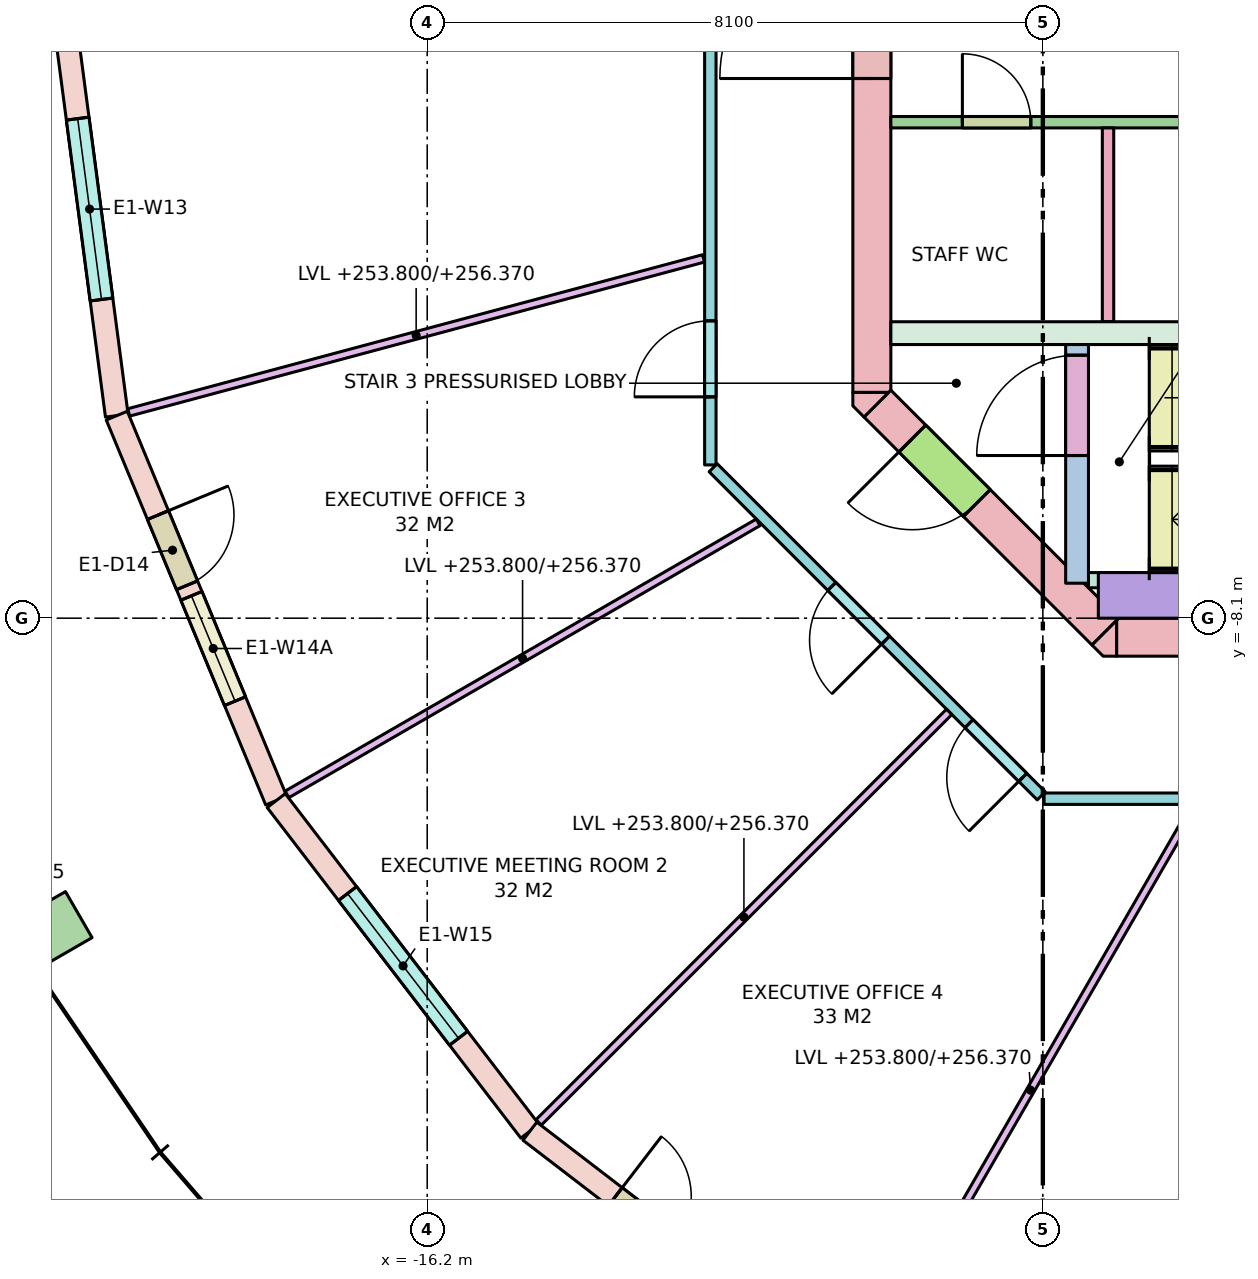
"""IFC4 building model, lengths in metres.
Left out: names, types, materials, properties, quantities, classifications, styles, units other than length and angle.
Written with IfcOpenShell. Run it as: python <this file> out.ifc"""

import sys

from ifc_helpers import new_model, si_unit, direction, frame, frame_2d, origin, origin_2d, place, context, subcontext, project, spatial, polyline, rectangle, outline, extrude, element, fill, save


model = new_model("IFC4")
c1 = context("Model", 3, precision=1e-05, world=origin(), true_north=direction((0.0, 1.0)))
c2 = subcontext(c1, "Body", "Model", "MODEL_VIEW")
j1 = project(units=[si_unit("LENGTHUNIT", "METRE"), si_unit("PLANEANGLEUNIT", "RADIAN")], contexts=[c1])
p1 = place(None, origin())
s1 = spatial("IfcSite", under=j1, at=p1, CompositionType="ELEMENT")
p2 = place(p1, origin())
s2 = spatial("IfcBuilding", under=s1, at=p2, CompositionType="ELEMENT")
p3 = place(p2, frame((0.0, 0.0, 253.8)))
s3 = spatial("IfcBuildingStorey", under=s2, at=p3, CompositionType="ELEMENT", Elevation=253.8)
p4 = place(p3, frame((-21.218, -12.25, 0.0), z_axis=(0.0, 0.0, 1.0), x_axis=(0.5, -0.866025403784, 0.0)))
e1 = element("IfcColumn", 1, at=p4, inside=s3, PredefinedType="COLUMN", context=c2, shape_type="SweptSolid", body=[
    extrude(rectangle(XDim=0.7, YDim=1.0, at=origin_2d()), origin(), (0.0, 0.0, 1.0), 3.7),
])
p5 = place(p3, frame((-7.13, -8.35, -0.28), z_axis=(0.0, 0.0, 1.0), x_axis=(1.0, 0.0, 0.0)))
e2 = element("IfcWall", 2, at=p5, inside=s3, PredefinedType="SHEAR", context=c2, shape_type="SweptSolid", body=[
    extrude(rectangle(XDim=14.26, YDim=0.5, at=frame_2d((7.13, 0.0))), origin(), (0.0, 0.0, 1.0), 3.7),
])
p6 = place(p5, frame((8.08, 0.0, 0.28)))
e3 = element("IfcOpeningElement", 3, at=p6, cuts=e2, PredefinedType="OPENING", context=c2, shape_type="SweptSolid", body=[
    extrude(rectangle(XDim=0.7, YDim=2.1, at=frame_2d((0.35, 1.05))), frame((0.0, 0.26, 0.0), z_axis=(0.0, -1.0, 0.0), x_axis=(1.0, 0.0, 0.0)), (0.0, 0.0, 1.0), 0.52),
])
p7 = place(p5, frame((6.205, 0.0, 0.28)))
e4 = element("IfcOpeningElement", 4, at=p7, cuts=e2, PredefinedType="OPENING", context=c2, shape_type="SweptSolid", body=[
    extrude(rectangle(XDim=0.9, YDim=2.1, at=frame_2d((0.45, 1.05))), frame((0.0, 0.26, 0.0), z_axis=(0.0, -1.0, 0.0), x_axis=(1.0, 0.0, 0.0)), (0.0, 0.0, 1.0), 0.52),
])
p8 = place(p5, frame((9.967, 0.0, 0.28)))
e5 = element("IfcOpeningElement", 5, at=p8, cuts=e2, PredefinedType="OPENING", context=c2, shape_type="SweptSolid", body=[
    extrude(rectangle(XDim=0.9, YDim=2.1, at=frame_2d((0.45, 1.05))), frame((0.0, 0.26, 0.0), z_axis=(0.0, -1.0, 0.0), x_axis=(1.0, 0.0, 0.0)), (0.0, 0.0, 1.0), 0.52),
])
p9 = place(p5, frame((12.567, 0.0, 0.28)))
e6 = element("IfcOpeningElement", 6, at=p9, cuts=e2, PredefinedType="OPENING", context=c2, shape_type="SweptSolid", body=[
    extrude(rectangle(XDim=0.9, YDim=2.1, at=frame_2d((0.45, 1.05))), frame((0.0, 0.26, 0.0), z_axis=(0.0, -1.0, 0.0), x_axis=(1.0, 0.0, 0.0)), (0.0, 0.0, 1.0), 0.52),
])
p10 = place(p3, frame((-10.35, -5.13, -0.28), z_axis=(0.0, 0.0, 1.0), x_axis=(0.0, 1.0, 0.0)))
e7 = element("IfcWall", 7, at=p10, inside=s3, PredefinedType="SHEAR", context=c2, shape_type="SweptSolid", body=[
    extrude(rectangle(XDim=10.26, YDim=0.5, at=frame_2d((5.13, 0.0))), origin(), (0.0, 0.0, 1.0), 3.7),
])
p11 = place(p10, frame((4.13, 0.0, 0.28)))
e8 = element("IfcOpeningElement", 8, at=p11, cuts=e7, PredefinedType="OPENING", context=c2, shape_type="SweptSolid", body=[
    extrude(rectangle(XDim=2.0, YDim=2.1, at=frame_2d((1.0, 1.05))), frame((0.0, 0.26, 0.0), z_axis=(0.0, -1.0, 0.0), x_axis=(1.0, 0.0, 0.0)), (0.0, 0.0, 1.0), 0.52),
])
p12 = place(p3, frame((-7.277, -8.277, -0.28), z_axis=(0.0, 0.0, 1.0), x_axis=(-0.707106781187, 0.707106781187, 0.0)))
e9 = element("IfcWall", 9, at=p12, inside=s3, PredefinedType="SHEAR", context=c2, shape_type="SweptSolid", body=[
    extrude(rectangle(XDim=4.243, YDim=0.5, at=frame_2d((2.121, 0.0))), origin(), (0.0, 0.0, 1.0), 3.7),
])
p13 = place(p12, frame((2.393, 0.0, 0.28)))
e10 = element("IfcOpeningElement", 10, at=p13, cuts=e9, PredefinedType="OPENING", context=c2, shape_type="SweptSolid", body=[
    extrude(rectangle(XDim=1.2, YDim=2.1, at=frame_2d((0.6, 1.05))), frame((0.0, 0.26, 0.0), z_axis=(0.0, -1.0, 0.0), x_axis=(1.0, 0.0, 0.0)), (0.0, 0.0, 1.0), 0.52),
])
p14 = place(p3, frame((0.0, 0.0, -0.28)))
e11 = element("IfcWall", 11, at=p14, inside=s3, PredefinedType="SHEAR", context=c2, shape_type="SweptSolid", body=[
    extrude(outline(polyline([(-7.307, -8.6), (-7.454, -8.454), (-7.13, -8.13), (-7.13, -8.6), (-7.307, -8.6)])), origin(), (0.0, 0.0, 1.0), 3.7),
])
p15 = place(p3, frame((0.0, 0.0, -0.28)))
e12 = element("IfcWall", 12, at=p15, inside=s3, PredefinedType="SHEAR", context=c2, shape_type="SweptSolid", body=[
    extrude(outline(polyline([(-10.6, -5.307), (-10.6, -5.13), (-10.13, -5.13), (-10.454, -5.454), (-10.6, -5.307)])), origin(), (0.0, 0.0, 1.0), 3.7),
])
p16 = place(p3, frame((-10.1, -4.35, 0.0), z_axis=(0.0, 0.0, 1.0), x_axis=(1.0, 0.0, 0.0)))
e13 = element("IfcWall", 13, at=p16, inside=s3, PredefinedType="SOLIDWALL", context=c2, shape_type="SweptSolid", body=[
    extrude(rectangle(XDim=8.1, YDim=0.3, at=frame_2d((4.05, 0.0))), origin(), (0.0, 0.0, 1.0), 3.42),
])
p17 = place(p3, frame((-7.65, -7.64, 0.0), z_axis=(0.0, 0.0, 1.0), x_axis=(0.0, 1.0, 0.0)))
e14 = element("IfcWall", 14, at=p17, inside=s3, PredefinedType="SHEAR", context=c2, shape_type="SweptSolid", body=[
    extrude(rectangle(XDim=3.14, YDim=0.3, at=frame_2d((1.57, 0.0))), origin(), (0.0, 0.0, 1.0), 3.42),
])
p18 = place(p17, frame((1.68, 0.0, 0.0)))
e15 = element("IfcOpeningElement", 15, at=p18, cuts=e14, PredefinedType="OPENING", context=c2, shape_type="SweptSolid", body=[
    extrude(rectangle(XDim=1.32, YDim=2.1, at=frame_2d((0.66, 1.05))), frame((0.0, 0.16, 0.0), z_axis=(0.0, -1.0, 0.0), x_axis=(1.0, 0.0, 0.0)), (0.0, 0.0, 1.0), 0.32),
])
p19 = place(p3, frame((-7.5, -7.6, 0.0), z_axis=(0.0, 0.0, 1.0), x_axis=(1.0, 0.0, 0.0)))
e16 = element("IfcWall", 16, at=p19, inside=s3, PredefinedType="SHEAR", context=c2, shape_type="SweptSolid", body=[
    extrude(rectangle(XDim=0.6, YDim=0.2, at=frame_2d((0.3, 0.0))), origin(), (0.0, 0.0, 1.0), 3.42),
])
p20 = place(p3, frame((-7.37, -7.8, 0.0), z_axis=(0.0, 0.0, 1.0), x_axis=(1.0, 0.0, 0.0)))
e17 = element("IfcWall", 17, at=p20, inside=s3, PredefinedType="SHEAR", context=c2, shape_type="SweptSolid", body=[
    extrude(rectangle(XDim=5.37, YDim=0.6, at=frame_2d((2.685, 0.0))), origin(), (0.0, 0.0, 1.0), 3.42),
])
p21 = place(p3, frame((-21.0, 0.0, 0.0), z_axis=(0.0, 0.0, 1.0), x_axis=(0.130527087244, -0.991444743541, 0.0)))
e18 = element("IfcWall", 18, at=p21, inside=s3, PredefinedType="STANDARD", context=c2, shape_type="SweptSolid", body=[
    extrude(rectangle(XDim=5.482, YDim=0.3, at=frame_2d((2.741, 0.0))), origin(), (0.0, 0.0, 1.0), 3.42),
])
p22 = place(p21, frame((1.541, 0.0, 0.8)))
e19 = element("IfcOpeningElement", 19, at=p22, cuts=e18, PredefinedType="OPENING", context=c2, shape_type="SweptSolid", body=[
    extrude(rectangle(XDim=2.4, YDim=2.4, at=frame_2d((1.2, 1.2))), frame((0.0, 0.16, 0.0), z_axis=(0.0, -1.0, 0.0), x_axis=(1.0, 0.0, 0.0)), (0.0, 0.0, 1.0), 0.32),
])
p23 = place(p3, frame((-20.284, -5.435, 0.0), z_axis=(0.0, 0.0, 1.0), x_axis=(0.382688740813, -0.923877333662, 0.0)))
e20 = element("IfcWall", 20, at=p23, inside=s3, PredefinedType="STANDARD", context=c2, shape_type="SweptSolid", body=[
    extrude(rectangle(XDim=5.482, YDim=0.3, at=frame_2d((2.741, 0.0))), origin(), (0.0, 0.0, 1.0), 3.42),
])
p24 = place(p23, frame((1.416, 0.0, 0.0)))
e21 = element("IfcOpeningElement", 21, at=p24, cuts=e20, PredefinedType="OPENING", context=c2, shape_type="SweptSolid", body=[
    extrude(rectangle(XDim=1.0, YDim=2.4, at=frame_2d((0.5, 1.2))), frame((0.0, 0.16, 0.0), z_axis=(0.0, -1.0, 0.0), x_axis=(1.0, 0.0, 0.0)), (0.0, 0.0, 1.0), 0.32),
])
p25 = place(p23, frame((2.566, 0.0, 0.8)))
e22 = element("IfcOpeningElement", 22, at=p25, cuts=e20, PredefinedType="OPENING", context=c2, shape_type="SweptSolid", body=[
    extrude(rectangle(XDim=1.5, YDim=2.4, at=frame_2d((0.75, 1.2))), frame((0.0, 0.16, 0.0), z_axis=(0.0, -1.0, 0.0), x_axis=(1.0, 0.0, 0.0)), (0.0, 0.0, 1.0), 0.32),
])
p26 = place(p3, frame((-18.187, -10.5, 0.0), z_axis=(0.0, 0.0, 1.0), x_axis=(0.608784891166, -0.793335336593, 0.0)))
e23 = element("IfcWall", 23, at=p26, inside=s3, PredefinedType="STANDARD", context=c2, shape_type="SweptSolid", body=[
    extrude(rectangle(XDim=5.482, YDim=0.3, at=frame_2d((2.741, 0.0))), origin(), (0.0, 0.0, 1.0), 3.42),
])
p27 = place(p26, frame((1.541, 0.0, 0.8)))
e24 = element("IfcOpeningElement", 24, at=p27, cuts=e23, PredefinedType="OPENING", context=c2, shape_type="SweptSolid", body=[
    extrude(rectangle(XDim=2.4, YDim=2.4, at=frame_2d((1.2, 1.2))), frame((0.0, 0.16, 0.0), z_axis=(0.0, -1.0, 0.0), x_axis=(1.0, 0.0, 0.0)), (0.0, 0.0, 1.0), 0.32),
])
p28 = place(p3, frame((-14.849, -14.849, 0.0), z_axis=(0.0, 0.0, 1.0), x_axis=(0.793335336593, -0.608784891166, 0.0)))
e25 = element("IfcWall", 25, at=p28, inside=s3, PredefinedType="STANDARD", context=c2, shape_type="SweptSolid", body=[
    extrude(rectangle(XDim=5.482, YDim=0.3, at=frame_2d((2.741, 0.0))), origin(), (0.0, 0.0, 1.0), 3.42),
])
p29 = place(p28, frame((1.416, 0.0, 0.0)))
e26 = element("IfcOpeningElement", 26, at=p29, cuts=e25, PredefinedType="OPENING", context=c2, shape_type="SweptSolid", body=[
    extrude(rectangle(XDim=1.0, YDim=2.4, at=frame_2d((0.5, 1.2))), frame((0.0, 0.16, 0.0), z_axis=(0.0, -1.0, 0.0), x_axis=(1.0, 0.0, 0.0)), (0.0, 0.0, 1.0), 0.32),
])
p30 = place(p28, frame((2.566, 0.0, 0.8)))
e27 = element("IfcOpeningElement", 27, at=p30, cuts=e25, PredefinedType="OPENING", context=c2, shape_type="SweptSolid", body=[
    extrude(rectangle(XDim=1.5, YDim=2.4, at=frame_2d((0.75, 1.2))), frame((0.0, 0.16, 0.0), z_axis=(0.0, -1.0, 0.0), x_axis=(1.0, 0.0, 0.0)), (0.0, 0.0, 1.0), 0.32),
])
p31 = place(p3, frame((-7.242, -4.2, 0.0), z_axis=(0.0, 0.0, 1.0), x_axis=(0.0, 1.0, 0.0)))
e28 = element("IfcWall", 28, at=p31, inside=s3, PredefinedType="PARTITIONING", context=c2, shape_type="SweptSolid", body=[
    extrude(rectangle(XDim=2.55, YDim=0.15, at=frame_2d((1.275, 0.0))), origin(), (0.0, 0.0, 1.0), 3.42),
])
p32 = place(p3, frame((-10.1, -1.575, 0.0), z_axis=(0.0, 0.0, 1.0), x_axis=(1.0, 0.0, 0.0)))
e29 = element("IfcWall", 29, at=p32, inside=s3, PredefinedType="PARTITIONING", context=c2, shape_type="SweptSolid", body=[
    extrude(rectangle(XDim=8.1, YDim=0.15, at=frame_2d((4.05, 0.0))), origin(), (0.0, 0.0, 1.0), 3.42),
])
p33 = place(p32, frame((0.941, 0.0, 0.0)))
e30 = element("IfcOpeningElement", 30, at=p33, cuts=e29, PredefinedType="OPENING", context=c2, shape_type="SweptSolid", body=[
    extrude(rectangle(XDim=0.9, YDim=2.1, at=frame_2d((0.45, 1.05))), frame((0.0, 0.085, 0.0), z_axis=(0.0, -1.0, 0.0), x_axis=(1.0, 0.0, 0.0)), (0.0, 0.0, 1.0), 0.17),
])
p34 = place(p32, frame((5.066, 0.0, 0.0)))
e31 = element("IfcOpeningElement", 31, at=p34, cuts=e29, PredefinedType="OPENING", context=c2, shape_type="SweptSolid", body=[
    extrude(rectangle(XDim=0.9, YDim=2.1, at=frame_2d((0.45, 1.05))), frame((0.0, 0.085, 0.0), z_axis=(0.0, -1.0, 0.0), x_axis=(1.0, 0.0, 0.0)), (0.0, 0.0, 1.0), 0.17),
])
p35 = place(p3, frame((8.084, -10.475, 0.0), z_axis=(0.0, 0.0, 1.0), x_axis=(-1.0, 0.0, 0.0)))
e32 = element("IfcWall", 32, at=p35, inside=s3, PredefinedType="PARTITIONING", context=c2, shape_type="SweptSolid", body=[
    extrude(rectangle(XDim=16.167, YDim=0.15, at=frame_2d((8.084, 0.0))), origin(), (0.0, 0.0, 1.0), 2.57),
])
p36 = place(p35, frame((12.065, 0.0, 0.0)))
e33 = element("IfcOpeningElement", 33, at=p36, cuts=e32, PredefinedType="OPENING", context=c2, shape_type="SweptSolid", body=[
    extrude(rectangle(XDim=0.9, YDim=2.1, at=frame_2d((0.45, 1.05))), frame((0.0, 0.085, 0.0), z_axis=(0.0, -1.0, 0.0), x_axis=(1.0, 0.0, 0.0)), (0.0, 0.0, 1.0), 0.17),
])
p37 = place(p35, frame((7.584, 0.0, 0.0)))
e34 = element("IfcOpeningElement", 34, at=p37, cuts=e32, PredefinedType="OPENING", context=c2, shape_type="SweptSolid", body=[
    extrude(rectangle(XDim=1.0, YDim=2.1, at=frame_2d((0.5, 1.05))), frame((0.0, 0.085, 0.0), z_axis=(0.0, -1.0, 0.0), x_axis=(1.0, 0.0, 0.0)), (0.0, 0.0, 1.0), 0.17),
])
p38 = place(p35, frame((3.153, 0.0, 0.0)))
e35 = element("IfcOpeningElement", 35, at=p38, cuts=e32, PredefinedType="OPENING", context=c2, shape_type="SweptSolid", body=[
    extrude(rectangle(XDim=1.0, YDim=2.1, at=frame_2d((0.5, 1.05))), frame((0.0, 0.085, 0.0), z_axis=(0.0, -1.0, 0.0), x_axis=(1.0, 0.0, 0.0)), (0.0, 0.0, 1.0), 0.17),
])
p39 = place(p3, frame((-8.121, -10.438, 0.0), z_axis=(0.0, 0.0, 1.0), x_axis=(-0.707106781187, 0.707106781187, 0.0)))
e36 = element("IfcWall", 36, at=p39, inside=s3, PredefinedType="PARTITIONING", context=c2, shape_type="SweptSolid", body=[
    extrude(rectangle(XDim=6.105, YDim=0.15, at=frame_2d((3.053, 0.0))), origin(), (0.0, 0.0, 1.0), 2.57),
])
p40 = place(p39, frame((2.897, 0.0, 0.0)))
e37 = element("IfcOpeningElement", 37, at=p40, cuts=e36, PredefinedType="OPENING", context=c2, shape_type="SweptSolid", body=[
    extrude(rectangle(XDim=1.0, YDim=2.1, at=frame_2d((0.5, 1.05))), frame((0.0, 0.085, 0.0), z_axis=(0.0, -1.0, 0.0), x_axis=(1.0, 0.0, 0.0)), (0.0, 0.0, 1.0), 0.17),
])
p41 = place(p39, frame((0.344, 0.0, 0.0)))
e38 = element("IfcOpeningElement", 38, at=p41, cuts=e36, PredefinedType="OPENING", context=c2, shape_type="SweptSolid", body=[
    extrude(rectangle(XDim=1.0, YDim=2.1, at=frame_2d((0.5, 1.05))), frame((0.0, 0.085, 0.0), z_axis=(0.0, -1.0, 0.0), x_axis=(1.0, 0.0, 0.0)), (0.0, 0.0, 1.0), 0.17),
])
p42 = place(p3, frame((-12.475, -6.084, 0.0), z_axis=(0.0, 0.0, 1.0), x_axis=(0.0, 1.0, 0.0)))
e39 = element("IfcWall", 39, at=p42, inside=s3, PredefinedType="PARTITIONING", context=c2, shape_type="SweptSolid", body=[
    extrude(rectangle(XDim=12.167, YDim=0.15, at=frame_2d((6.084, 0.0))), origin(), (0.0, 0.0, 1.0), 2.57),
])
p43 = place(p42, frame((6.928, 0.0, 0.0)))
e40 = element("IfcOpeningElement", 40, at=p43, cuts=e39, PredefinedType="OPENING", context=c2, shape_type="SweptSolid", body=[
    extrude(rectangle(XDim=1.0, YDim=2.1, at=frame_2d((0.5, 1.05))), frame((0.0, 0.085, 0.0), z_axis=(0.0, -1.0, 0.0), x_axis=(1.0, 0.0, 0.0)), (0.0, 0.0, 1.0), 0.17),
])
p44 = place(p42, frame((0.896, 0.0, 0.0)))
e41 = element("IfcOpeningElement", 41, at=p44, cuts=e39, PredefinedType="OPENING", context=c2, shape_type="SweptSolid", body=[
    extrude(rectangle(XDim=1.0, YDim=2.1, at=frame_2d((0.5, 1.05))), frame((0.0, 0.085, 0.0), z_axis=(0.0, -1.0, 0.0), x_axis=(1.0, 0.0, 0.0)), (0.0, 0.0, 1.0), 0.17),
])
p45 = place(p3, frame((-12.564, -3.367, 0.0), z_axis=(0.0, 0.0, 1.0), x_axis=(-0.965933576344, -0.258790119773, 0.0)))
e42 = element("IfcWall", 42, at=p45, inside=s3, PredefinedType="PARTITIONING", context=c2, shape_type="SweptSolid", body=[
    extrude(rectangle(XDim=7.829, YDim=0.1, at=frame_2d((3.915, 0.0))), origin(), (0.0, 0.0, 1.0), 2.57),
])
p46 = place(p3, frame((-11.846, -6.839, 0.0), z_axis=(0.0, 0.0, 1.0), x_axis=(-0.866011787705, -0.500023583, 0.0)))
e43 = element("IfcWall", 43, at=p46, inside=s3, PredefinedType="PARTITIONING", context=c2, shape_type="SweptSolid", body=[
    extrude(rectangle(XDim=7.158, YDim=0.1, at=frame_2d((3.579, 0.0))), origin(), (0.0, 0.0, 1.0), 2.57),
])
p47 = place(p3, frame((-9.333, -9.333, 0.0), z_axis=(0.0, 0.0, 1.0), x_axis=(-0.707106781187, -0.707106781187, 0.0)))
e44 = element("IfcWall", 44, at=p47, inside=s3, PredefinedType="PARTITIONING", context=c2, shape_type="SweptSolid", body=[
    extrude(rectangle(XDim=7.639, YDim=0.1, at=frame_2d((3.819, 0.0))), origin(), (0.0, 0.0, 1.0), 2.57),
])
p48 = place(p3, frame((-6.105, -10.575, 0.0), z_axis=(0.0, 0.0, 1.0), x_axis=(-0.50001399067, -0.866017326117, 0.0)))
e45 = element("IfcWall", 45, at=p48, inside=s3, PredefinedType="PARTITIONING", context=c2, shape_type="SweptSolid", body=[
    extrude(rectangle(XDim=8.626, YDim=0.1, at=frame_2d((4.313, 0.0))), origin(), (0.0, 0.0, 1.0), 2.57),
])
p49 = place(p22, origin())
e46 = element("IfcWindow", 46, at=p49, inside=s3, PartitioningType="SINGLE_PANEL", PredefinedType="WINDOW", context=c2, shape_type="SweptSolid", body=[
    extrude(rectangle(XDim=2.4, YDim=2.4, at=frame_2d((1.2, 1.2))), frame((0.0, 0.03, 0.0), z_axis=(0.0, -1.0, 0.0), x_axis=(1.0, 0.0, 0.0)), (0.0, 0.0, 1.0), 0.06),
])
fill(e19, e46)
p50 = place(p24, origin())
e47 = element("IfcDoor", 47, at=p50, inside=s3, OperationType="SINGLE_SWING_LEFT", PredefinedType="DOOR", context=c2, shape_type="SweptSolid", body=[
    extrude(rectangle(XDim=1.0, YDim=2.4, at=frame_2d((0.5, 1.2))), frame((0.0, 0.025, 0.0), z_axis=(0.0, -1.0, 0.0), x_axis=(1.0, 0.0, 0.0)), (0.0, 0.0, 1.0), 0.05),
])
fill(e21, e47)
p51 = place(p25, origin())
e48 = element("IfcWindow", 48, at=p51, inside=s3, PartitioningType="SINGLE_PANEL", PredefinedType="WINDOW", context=c2, shape_type="SweptSolid", body=[
    extrude(rectangle(XDim=1.5, YDim=2.4, at=frame_2d((0.75, 1.2))), frame((0.0, 0.03, 0.0), z_axis=(0.0, -1.0, 0.0), x_axis=(1.0, 0.0, 0.0)), (0.0, 0.0, 1.0), 0.06),
])
fill(e22, e48)
p52 = place(p27, origin())
e49 = element("IfcWindow", 49, at=p52, inside=s3, PartitioningType="SINGLE_PANEL", PredefinedType="WINDOW", context=c2, shape_type="SweptSolid", body=[
    extrude(rectangle(XDim=2.4, YDim=2.4, at=frame_2d((1.2, 1.2))), frame((0.0, 0.03, 0.0), z_axis=(0.0, -1.0, 0.0), x_axis=(1.0, 0.0, 0.0)), (0.0, 0.0, 1.0), 0.06),
])
fill(e24, e49)
p53 = place(p29, origin())
e50 = element("IfcDoor", 50, at=p53, inside=s3, OperationType="SINGLE_SWING_LEFT", PredefinedType="DOOR", context=c2, shape_type="SweptSolid", body=[
    extrude(rectangle(XDim=1.0, YDim=2.4, at=frame_2d((0.5, 1.2))), frame((0.0, 0.025, 0.0), z_axis=(0.0, -1.0, 0.0), x_axis=(1.0, 0.0, 0.0)), (0.0, 0.0, 1.0), 0.05),
])
fill(e26, e50)
p54 = place(p18, origin())
e51 = element("IfcDoor", 51, at=p54, inside=s3, OperationType="DOUBLE_DOOR_SINGLE_SWING", PredefinedType="DOOR", context=c2, shape_type="SweptSolid", body=[
    extrude(rectangle(XDim=1.32, YDim=2.1, at=frame_2d((0.66, 1.05))), frame((0.0, 0.025, 0.0), z_axis=(0.0, -1.0, 0.0), x_axis=(1.0, 0.0, 0.0)), (0.0, 0.0, 1.0), 0.05),
])
fill(e15, e51)
p55 = place(p13, origin())
e52 = element("IfcDoor", 52, at=p55, inside=s3, OperationType="SINGLE_SWING_RIGHT", PredefinedType="DOOR", context=c2, shape_type="SweptSolid", body=[
    extrude(rectangle(XDim=1.2, YDim=2.1, at=frame_2d((0.6, 1.05))), frame((0.0, 0.025, 0.0), z_axis=(0.0, -1.0, 0.0), x_axis=(1.0, 0.0, 0.0)), (0.0, 0.0, 1.0), 0.05),
])
fill(e10, e52)
p56 = place(p11, origin())
e53 = element("IfcDoor", 53, at=p56, inside=s3, OperationType="DOUBLE_DOOR_SINGLE_SWING", PredefinedType="DOOR", context=c2, shape_type="SweptSolid", body=[
    extrude(rectangle(XDim=2.0, YDim=2.1, at=frame_2d((1.0, 1.05))), frame((0.0, 0.025, 0.0), z_axis=(0.0, -1.0, 0.0), x_axis=(1.0, 0.0, 0.0)), (0.0, 0.0, 1.0), 0.05),
])
fill(e8, e53)
p57 = place(p33, origin())
e54 = element("IfcDoor", 54, at=p57, inside=s3, OperationType="SINGLE_SWING_LEFT", PredefinedType="DOOR", context=c2, shape_type="SweptSolid", body=[
    extrude(rectangle(XDim=0.9, YDim=2.1, at=frame_2d((0.45, 1.05))), frame((0.0, 0.025, 0.0), z_axis=(0.0, -1.0, 0.0), x_axis=(1.0, 0.0, 0.0)), (0.0, 0.0, 1.0), 0.05),
])
fill(e30, e54)
p58 = place(p44, origin())
e55 = element("IfcDoor", 55, at=p58, inside=s3, OperationType="SINGLE_SWING_LEFT", PredefinedType="DOOR", context=c2, shape_type="SweptSolid", body=[
    extrude(rectangle(XDim=1.0, YDim=2.1, at=frame_2d((0.5, 1.05))), frame((0.0, 0.025, 0.0), z_axis=(0.0, -1.0, 0.0), x_axis=(1.0, 0.0, 0.0)), (0.0, 0.0, 1.0), 0.05),
])
fill(e41, e55)
p59 = place(p40, origin())
e56 = element("IfcDoor", 56, at=p59, inside=s3, OperationType="SINGLE_SWING_LEFT", PredefinedType="DOOR", context=c2, shape_type="SweptSolid", body=[
    extrude(rectangle(XDim=1.0, YDim=2.1, at=frame_2d((0.5, 1.05))), frame((0.0, 0.025, 0.0), z_axis=(0.0, -1.0, 0.0), x_axis=(1.0, 0.0, 0.0)), (0.0, 0.0, 1.0), 0.05),
])
fill(e37, e56)
p60 = place(p41, origin())
e57 = element("IfcDoor", 57, at=p60, inside=s3, OperationType="SINGLE_SWING_LEFT", PredefinedType="DOOR", context=c2, shape_type="SweptSolid", body=[
    extrude(rectangle(XDim=1.0, YDim=2.1, at=frame_2d((0.5, 1.05))), frame((0.0, 0.025, 0.0), z_axis=(0.0, -1.0, 0.0), x_axis=(1.0, 0.0, 0.0)), (0.0, 0.0, 1.0), 0.05),
])
fill(e38, e57)
save(model, sys.argv[1])
